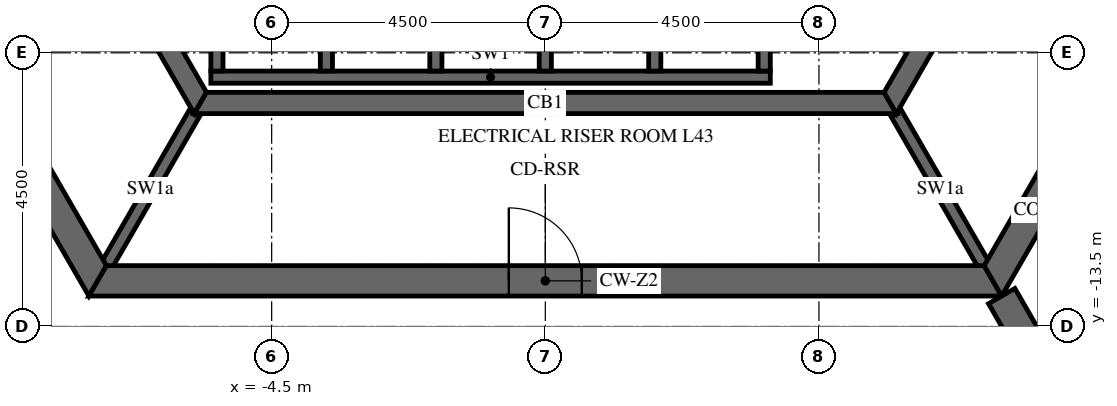
"""IFC4 building model, lengths in metres.
Left out: names, types, materials, properties, quantities, classifications, styles, units other than length and angle.
Written with IfcOpenShell. Run it as: python <this file> out.ifc"""

import sys

from ifc_helpers import new_model, si_unit, direction, frame, frame_2d, origin, place, context, subcontext, project, spatial, polyline, rectangle, outline, extrude, element, fill, save


model = new_model("IFC4")
c1 = context("Model", 3, precision=1e-05, world=origin(), true_north=direction((0.0, 1.0)))
c2 = subcontext(c1, "Body", "Model", "MODEL_VIEW")
j1 = project(units=[si_unit("LENGTHUNIT", "METRE"), si_unit("PLANEANGLEUNIT", "RADIAN")], contexts=[c1])
p1 = place(None, origin())
s1 = spatial("IfcSite", under=j1, at=p1, CompositionType="ELEMENT")
p2 = place(p1, origin())
s2 = spatial("IfcBuilding", under=s1, at=p2, CompositionType="ELEMENT")
p3 = place(p2, frame((0.0, 0.0, 183.9)))
s3 = spatial("IfcBuildingStorey", under=s2, at=p3, CompositionType="ELEMENT", Elevation=183.9)
p4 = place(p3, frame((-14.722, 0.0, -0.15), z_axis=(0.0, 0.0, 1.0), x_axis=(0.50000571537, -0.866022103989, 0.0)))
e1 = element("IfcWall", 1, at=p4, inside=s3, PredefinedType="SHEAR", context=c2, shape_type="SweptSolid", body=[
    extrude(outline(polyline([(-0.144, -0.25), (14.867, -0.25), (14.578, 0.25), (0.144, 0.25), (-0.144, -0.25)])), origin(), (0.0, 0.0, 1.0), 3.9),
])
p5 = place(p4, frame((6.432, 0.0, 0.15)))
e2 = element("IfcOpeningElement", 2, at=p5, cuts=e1, PredefinedType="OPENING", context=c2, shape_type="SweptSolid", body=[
    extrude(rectangle(XDim=1.8, YDim=2.4, at=frame_2d((0.9, 1.2))), frame((0.0, 0.26, 0.0), z_axis=(0.0, -1.0, 0.0), x_axis=(1.0, 0.0, 0.0)), (0.0, 0.0, 1.0), 0.52),
])
p6 = place(p3, frame((-7.361, -12.75, -0.15), z_axis=(0.0, 0.0, 1.0), x_axis=(1.0, 0.0, 0.0)))
e3 = element("IfcWall", 3, at=p6, inside=s3, PredefinedType="SHEAR", context=c2, shape_type="SweptSolid", body=[
    extrude(outline(polyline([(-0.144, -0.25), (14.866, -0.25), (14.578, 0.25), (0.144, 0.25), (-0.144, -0.25)])), origin(), (0.0, 0.0, 1.0), 3.9),
])
p7 = place(p6, frame((6.761, 0.0, 0.15)))
e4 = element("IfcOpeningElement", 4, at=p7, cuts=e3, PredefinedType="OPENING", context=c2, shape_type="SweptSolid", body=[
    extrude(rectangle(XDim=1.2, YDim=2.4, at=frame_2d((0.6, 1.2))), frame((0.0, 0.26, 0.0), z_axis=(0.0, -1.0, 0.0), x_axis=(1.0, 0.0, 0.0)), (0.0, 0.0, 1.0), 0.52),
])
p8 = place(p3, frame((7.361, -12.75, -0.15), z_axis=(0.0, 0.0, 1.0), x_axis=(0.50000571537, 0.866022103989, 0.0)))
e5 = element("IfcWall", 5, at=p8, inside=s3, PredefinedType="SHEAR", context=c2, shape_type="SweptSolid", body=[
    extrude(outline(polyline([(-0.144, -0.25), (14.867, -0.25), (14.578, 0.25), (0.144, 0.25), (-0.144, -0.25)])), origin(), (0.0, 0.0, 1.0), 3.9),
])
p9 = place(p8, frame((6.49, 0.0, 0.15)))
e6 = element("IfcOpeningElement", 6, at=p9, cuts=e5, PredefinedType="OPENING", context=c2, shape_type="SweptSolid", body=[
    extrude(rectangle(XDim=1.8, YDim=2.4, at=frame_2d((0.9, 1.2))), frame((0.0, 0.26, 0.0), z_axis=(0.0, -1.0, 0.0), x_axis=(1.0, 0.0, 0.0)), (0.0, 0.0, 1.0), 0.52),
])
p10 = place(p3, frame((7.506, -13.0, -0.15), z_axis=(0.0, 0.0, 1.0), x_axis=(0.499988271576, -0.866032175087, 0.0)))
e7 = element("IfcWall", 7, at=p10, inside=s3, PredefinedType="SHEAR", context=c2, shape_type="SweptSolid", body=[
    extrude(rectangle(XDim=15.424, YDim=0.5, at=frame_2d((7.712, 0.0))), origin(), (0.0, 0.0, 1.0), 3.9),
])
p11 = place(p10, frame((6.812, 0.0, 0.15)))
e8 = element("IfcOpeningElement", 8, at=p11, cuts=e7, PredefinedType="OPENING", context=c2, shape_type="SweptSolid", body=[
    extrude(rectangle(XDim=1.8, YDim=2.4, at=frame_2d((0.9, 1.2))), frame((0.0, 0.26, 0.0), z_axis=(0.0, -1.0, 0.0), x_axis=(1.0, 0.0, 0.0)), (0.0, 0.0, 1.0), 0.52),
])
p12 = place(p3, frame((-11.345, 0.0, -0.15), z_axis=(0.0, 0.0, 1.0), x_axis=(0.499995046907, -0.866028263435, 0.0)))
e9 = element("IfcWall", 9, at=p12, inside=s3, PredefinedType="SHEAR", context=c2, shape_type="SweptSolid", body=[
    extrude(outline(polyline([(-0.101, -0.175), (11.446, -0.175), (11.244, 0.175), (0.101, 0.175), (-0.101, -0.175)])), origin(), (0.0, 0.0, 1.0), 3.9),
])
p13 = place(p12, frame((4.744, 0.0, 0.15)))
e10 = element("IfcOpeningElement", 10, at=p13, cuts=e9, PredefinedType="OPENING", context=c2, shape_type="SweptSolid", body=[
    extrude(rectangle(XDim=1.8, YDim=2.4, at=frame_2d((0.9, 1.2))), frame((0.0, 0.185, 0.0), z_axis=(0.0, -1.0, 0.0), x_axis=(1.0, 0.0, 0.0)), (0.0, 0.0, 1.0), 0.37),
])
p14 = place(p3, frame((-5.673, -9.825, -0.15), z_axis=(0.0, 0.0, 1.0), x_axis=(1.0, 0.0, 0.0)))
e11 = element("IfcWall", 11, at=p14, inside=s3, PredefinedType="SHEAR", context=c2, shape_type="SweptSolid", body=[
    extrude(outline(polyline([(-0.101, -0.175), (11.446, -0.175), (11.244, 0.175), (0.101, 0.175), (-0.101, -0.175)])), origin(), (0.0, 0.0, 1.0), 3.9),
])
p15 = place(p3, frame((5.673, -9.825, -0.15), z_axis=(0.0, 0.0, 1.0), x_axis=(0.499995046907, 0.866028263435, 0.0)))
e12 = element("IfcWall", 12, at=p15, inside=s3, PredefinedType="SHEAR", context=c2, shape_type="SweptSolid", body=[
    extrude(outline(polyline([(-0.101, -0.175), (11.446, -0.175), (11.244, 0.175), (0.101, 0.175), (-0.101, -0.175)])), origin(), (0.0, 0.0, 1.0), 3.9),
])
p16 = place(p15, frame((4.801, 0.0, 0.15)))
e13 = element("IfcOpeningElement", 13, at=p16, cuts=e12, PredefinedType="OPENING", context=c2, shape_type="SweptSolid", body=[
    extrude(rectangle(XDim=1.8, YDim=2.4, at=frame_2d((0.9, 1.2))), frame((0.0, 0.185, 0.0), z_axis=(0.0, -1.0, 0.0), x_axis=(1.0, 0.0, 0.0)), (0.0, 0.0, 1.0), 0.37),
])
p17 = place(p3, frame((-5.5, -9.4, -0.25), z_axis=(0.0, 0.0, 1.0), x_axis=(1.0, 0.0, 0.0)))
e14 = element("IfcWall", 14, at=p17, inside=s3, PredefinedType="SHEAR", context=c2, shape_type="SweptSolid", body=[
    extrude(rectangle(XDim=9.2, YDim=0.2, at=frame_2d((4.6, 0.0))), origin(), (0.0, 0.0, 1.0), 3.9),
])
for number, where, z_axis, x_axis in (
    (15, (-5.4, -9.3, -0.25), (0.0, 0.0, 1.0), (0.0, 1.0, 0.0)),
    (16, (-3.6, -9.3, -0.25), (0.0, 0.0, 1.0), (0.0, 1.0, 0.0)),
    (17, (-1.8, -9.3, -0.25), (0.0, 0.0, 1.0), (0.0, 1.0, 0.0)),
    (18, (0.0, -9.3, -0.25), (0.0, 0.0, 1.0), (0.0, 1.0, 0.0)),
    (19, (1.8, -9.3, -0.25), (0.0, 0.0, 1.0), (0.0, 1.0, 0.0)),
    (20, (3.6, -9.3, -0.25), (0.0, 0.0, 1.0), (0.0, 1.0, 0.0)),
):
    element("IfcWall", number, at=place(p3, frame(where, z_axis=z_axis, x_axis=x_axis)), inside=s3, PredefinedType="SHEAR", context=c2, shape_type="SweptSolid", body=[
        extrude(rectangle(XDim=2.9, YDim=0.2, at=frame_2d((1.45, 0.0))), origin(), (0.0, 0.0, 1.0), 3.9),
    ])
for number, where, z_axis, x_axis in (
    (21, (-5.773, -10.0, -0.15), (0.0, 0.0, 1.0), (-0.5, -0.866, 0.0)),
    (22, (5.773, -10.0, -0.15), (0.0, 0.0, 1.0), (0.5, -0.866, 0.0)),
):
    element("IfcWall", number, at=place(p3, frame(where, z_axis=z_axis, x_axis=x_axis)), inside=s3, PredefinedType="SHEAR", context=c2, shape_type="SweptSolid", body=[
        extrude(rectangle(XDim=2.887, YDim=0.2, at=frame_2d((1.443, 0.0))), origin(), (0.0, 0.0, 1.0), 3.9),
    ])
p18 = place(p7, origin())
e23 = element("IfcDoor", 23, at=p18, inside=s3, OperationType="SINGLE_SWING_LEFT", PredefinedType="DOOR", context=c2, shape_type="SweptSolid", body=[
    extrude(rectangle(XDim=1.2, YDim=2.4, at=frame_2d((0.6, 1.2))), frame((0.0, 0.025, 0.0), z_axis=(0.0, -1.0, 0.0), x_axis=(1.0, 0.0, 0.0)), (0.0, 0.0, 1.0), 0.05),
])
fill(e4, e23)
save(model, sys.argv[1])
